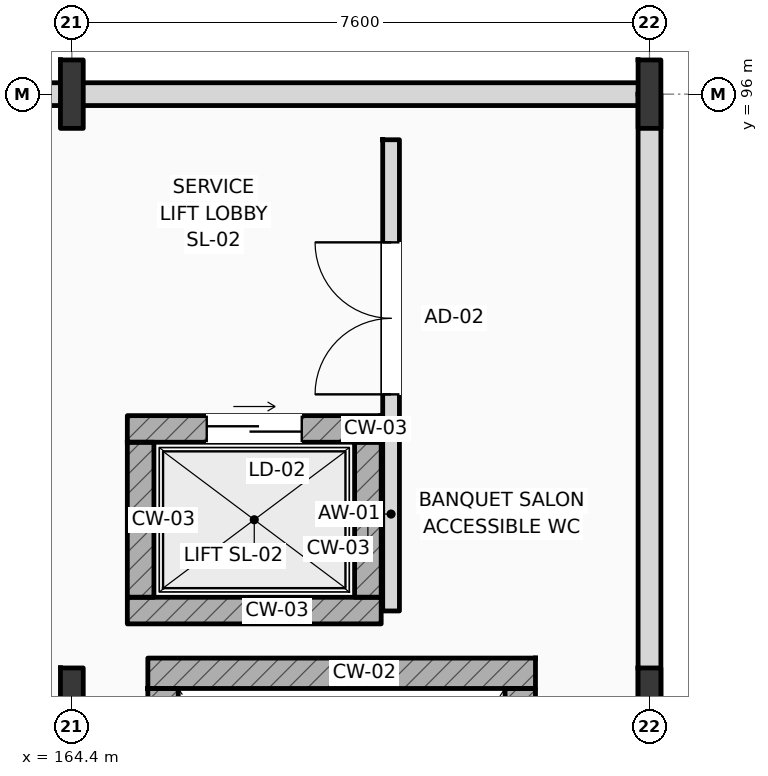
"""IFC4 building model, lengths in metres.
Left out: names, types, materials, properties, quantities, classifications, styles, units other than length and angle.
Written with IfcOpenShell. Run it as: python <this file> out.ifc"""

import sys

from ifc_helpers import new_model, si_unit, direction, frame, frame_2d, origin, origin_2d, place, context, subcontext, project, spatial, rectangle, i_section, extrude, element, fill, save


model = new_model("IFC4")
c1 = context("Model", 3, precision=1e-05, world=origin(), true_north=direction((0.0, 1.0)))
c2 = subcontext(c1, "Body", "Model", "MODEL_VIEW")
j1 = project(units=[si_unit("LENGTHUNIT", "METRE"), si_unit("PLANEANGLEUNIT", "RADIAN")], contexts=[c1])
p1 = place(None, origin())
s1 = spatial("IfcSite", under=j1, at=p1, CompositionType="ELEMENT")
p2 = place(p1, origin())
s2 = spatial("IfcBuilding", under=s1, at=p2, CompositionType="ELEMENT")
p3 = place(p2, frame((0.0, 0.0, 11.4)))
s3 = spatial("IfcBuildingStorey", under=s2, at=p3, CompositionType="ELEMENT", Elevation=11.4)
for number, where, z_axis, x_axis in (
    (1, (164.4, 88.0, 0.0), (0.0, 0.0, 1.0), (1.0, 0.0, 0.0)),
    (2, (164.4, 96.0, 0.0), (0.0, 0.0, 1.0), (1.0, 0.0, 0.0)),
    (3, (172.0, 88.0, 0.0), (0.0, 0.0, 1.0), (1.0, 0.0, 0.0)),
    (4, (172.0, 96.0, 0.0), (0.0, 0.0, 1.0), (1.0, 0.0, 0.0)),
):
    element("IfcColumn", number, at=place(p3, frame(where, z_axis=z_axis, x_axis=x_axis)), inside=s3, PredefinedType="COLUMN", context=c2, shape_type="SweptSolid", body=[
        extrude(i_section(OverallWidth=0.3, OverallDepth=0.9, WebThickness=0.019, FlangeThickness=0.035, FilletRadius=0.03, at=origin_2d()), origin(), (0.0, 0.0, 1.0), 4.8),
    ])
p4 = place(p3, frame((165.4, 88.38, 0.0), z_axis=(0.0, 0.0, 1.0), x_axis=(1.0, 0.0, 0.0)))
e5 = element("IfcWall", 5, at=p4, inside=s3, PredefinedType="SHEAR", context=c2, shape_type="SweptSolid", body=[
    extrude(rectangle(XDim=5.1, YDim=0.4, at=frame_2d((2.55, 0.0))), origin(), (0.0, 0.0, 1.0), 4.8),
])
p5 = place(p3, frame((165.6, 79.6, 0.0), z_axis=(0.0, 0.0, 1.0), x_axis=(0.0, 1.0, 0.0)))
e6 = element("IfcWall", 6, at=p5, inside=s3, PredefinedType="SHEAR", context=c2, shape_type="SweptSolid", body=[
    extrude(rectangle(XDim=8.58, YDim=0.4, at=frame_2d((4.29, 0.0))), origin(), (0.0, 0.0, 1.0), 4.8),
])
p6 = place(p5, frame((0.225, 0.0, 0.0)))
e7 = element("IfcOpeningElement", 7, at=p6, cuts=e6, PredefinedType="OPENING", context=c2, shape_type="SweptSolid", body=[
    extrude(rectangle(XDim=1.6, YDim=2.2, at=frame_2d((0.8, 1.1))), frame((0.0, 0.21, 0.0), z_axis=(0.0, -1.0, 0.0), x_axis=(1.0, 0.0, 0.0)), (0.0, 0.0, 1.0), 0.42),
])
p7 = place(p3, frame((170.3, 79.6, 0.0), z_axis=(0.0, 0.0, 1.0), x_axis=(0.0, 1.0, 0.0)))
e8 = element("IfcWall", 8, at=p7, inside=s3, PredefinedType="SHEAR", context=c2, shape_type="SweptSolid", body=[
    extrude(rectangle(XDim=8.58, YDim=0.4, at=frame_2d((4.29, 0.0))), origin(), (0.0, 0.0, 1.0), 4.8),
])
p8 = place(p3, frame((155.4, 96.0, 0.0), z_axis=(0.0, 0.0, 1.0), x_axis=(1.0, 0.0, 0.0)))
e9 = element("IfcWall", 9, at=p8, inside=s3, PredefinedType="STANDARD", context=c2, shape_type="SweptSolid", body=[
    extrude(rectangle(XDim=9.0, YDim=0.3, at=frame_2d((4.5, 0.0))), origin(), (0.0, 0.0, 1.0), 4.05),
])
p9 = place(p3, frame((164.4, 96.0, 0.0), z_axis=(0.0, 0.0, 1.0), x_axis=(1.0, 0.0, 0.0)))
e10 = element("IfcWall", 10, at=p9, inside=s3, PredefinedType="STANDARD", context=c2, shape_type="SweptSolid", body=[
    extrude(rectangle(XDim=7.6, YDim=0.3, at=frame_2d((3.8, 0.0))), origin(), (0.0, 0.0, 1.0), 4.2),
])
p10 = place(p3, frame((172.0, 88.0, 0.0), z_axis=(0.0, 0.0, 1.0), x_axis=(0.0, 1.0, 0.0)))
e11 = element("IfcWall", 11, at=p10, inside=s3, PredefinedType="STANDARD", context=c2, shape_type="SweptSolid", body=[
    extrude(rectangle(XDim=8.0, YDim=0.3, at=frame_2d((4.0, 0.0))), origin(), (0.0, 0.0, 1.0), 4.25),
])
p11 = place(p3, frame((165.13, 91.595, 0.0), z_axis=(0.0, 0.0, 1.0), x_axis=(1.0, 0.0, 0.0)))
e12 = element("IfcWall", 12, at=p11, inside=s3, PredefinedType="SHEAR", context=c2, shape_type="SweptSolid", body=[
    extrude(rectangle(XDim=3.34, YDim=0.35, at=frame_2d((1.67, 0.0))), origin(), (0.0, 0.0, 1.0), 4.52),
])
p12 = place(p11, frame((1.045, 0.0, 0.0)))
e13 = element("IfcOpeningElement", 13, at=p12, cuts=e12, PredefinedType="OPENING", context=c2, shape_type="SweptSolid", body=[
    extrude(rectangle(XDim=1.25, YDim=2.25, at=frame_2d((0.625, 1.125))), frame((0.0, 0.185, 0.0), z_axis=(0.0, -1.0, 0.0), x_axis=(1.0, 0.0, 0.0)), (0.0, 0.0, 1.0), 0.37),
])
p13 = place(p3, frame((165.13, 89.205, 0.0), z_axis=(0.0, 0.0, 1.0), x_axis=(1.0, 0.0, 0.0)))
e14 = element("IfcWall", 14, at=p13, inside=s3, PredefinedType="SHEAR", context=c2, shape_type="SweptSolid", body=[
    extrude(rectangle(XDim=3.34, YDim=0.35, at=frame_2d((1.67, 0.0))), origin(), (0.0, 0.0, 1.0), 4.52),
])
for number, where, z_axis, x_axis in (
    (15, (165.305, 89.38, 0.0), (0.0, 0.0, 1.0), (0.0, 1.0, 0.0)),
    (16, (168.295, 89.38, 0.0), (0.0, 0.0, 1.0), (0.0, 1.0, 0.0)),
):
    element("IfcWall", number, at=place(p3, frame(where, z_axis=z_axis, x_axis=x_axis)), inside=s3, PredefinedType="SHEAR", context=c2, shape_type="SweptSolid", body=[
        extrude(rectangle(XDim=2.04, YDim=0.35, at=frame_2d((1.02, 0.0))), origin(), (0.0, 0.0, 1.0), 4.52),
    ])
p14 = place(p3, frame((168.6, 89.2, 0.0), z_axis=(0.0, 0.0, 1.0), x_axis=(0.0, 1.0, 0.0)))
e17 = element("IfcWall", 17, at=p14, inside=s3, PredefinedType="PARTITIONING", context=c2, shape_type="SweptSolid", body=[
    extrude(rectangle(XDim=6.2, YDim=0.22, at=frame_2d((3.1, 0.0))), origin(), (0.0, 0.0, 1.0), 4.52),
])
p15 = place(p14, frame((2.85, 0.0, 0.0)))
e18 = element("IfcOpeningElement", 18, at=p15, cuts=e17, PredefinedType="OPENING", context=c2, shape_type="SweptSolid", body=[
    extrude(rectangle(XDim=2.0, YDim=2.35, at=frame_2d((1.0, 1.175))), frame((0.0, 0.12, 0.0), z_axis=(0.0, -1.0, 0.0), x_axis=(1.0, 0.0, 0.0)), (0.0, 0.0, 1.0), 0.24),
])
p16 = place(p12, origin())
e19 = element("IfcDoor", 19, at=p16, inside=s3, OperationType="SLIDING_TO_LEFT", PredefinedType="DOOR", context=c2, shape_type="SweptSolid", body=[
    extrude(rectangle(XDim=1.25, YDim=2.25, at=frame_2d((0.625, 1.125))), frame((0.0, 0.025, 0.0), z_axis=(0.0, -1.0, 0.0), x_axis=(1.0, 0.0, 0.0)), (0.0, 0.0, 1.0), 0.05),
])
fill(e13, e19)
p17 = place(p15, origin())
e20 = element("IfcDoor", 20, at=p17, inside=s3, OperationType="DOUBLE_SWING_LEFT", PredefinedType="DOOR", context=c2, shape_type="SweptSolid", body=[
    extrude(rectangle(XDim=2.0, YDim=2.35, at=frame_2d((1.0, 1.175))), frame((0.0, 0.025, 0.0), z_axis=(0.0, -1.0, 0.0), x_axis=(1.0, 0.0, 0.0)), (0.0, 0.0, 1.0), 0.05),
])
fill(e18, e20)
save(model, sys.argv[1])
